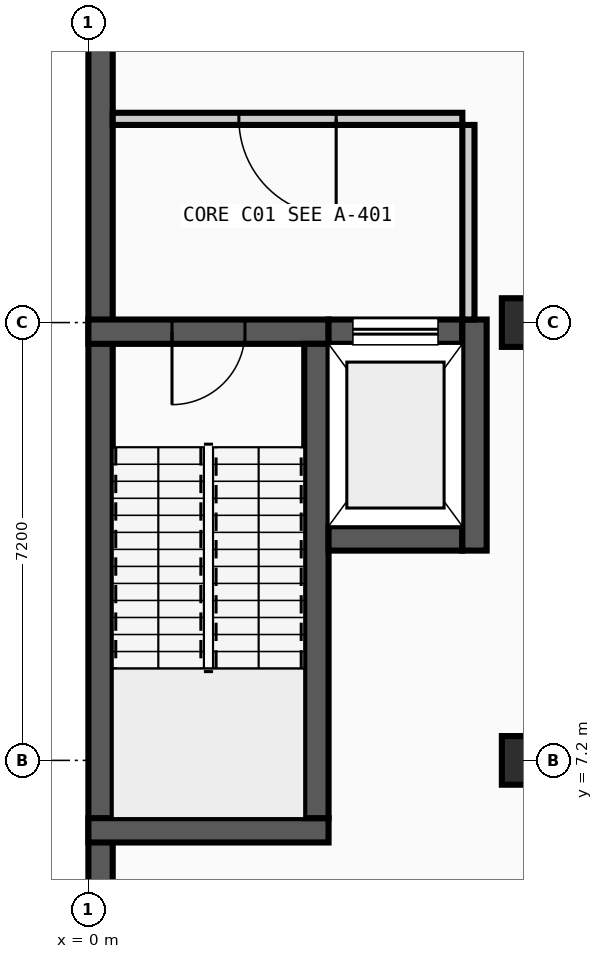
"""IFC4 building model, lengths in metres.
Left out: names, types, materials, properties, quantities, classifications, styles, units other than length and angle.
Written with IfcOpenShell. Run it as: python <this file> out.ifc"""

import sys

from ifc_helpers import new_model, si_unit, direction, frame, frame_2d, origin, origin_2d, place, context, subcontext, project, spatial, rectangle, extrude, element, fill, save


model = new_model("IFC4")
c1 = context("Model", 3, precision=1e-05, world=origin(), true_north=direction((0.0, 1.0)))
c2 = subcontext(c1, "Body", "Model", "MODEL_VIEW")
j1 = project(units=[si_unit("LENGTHUNIT", "METRE"), si_unit("PLANEANGLEUNIT", "RADIAN")], contexts=[c1])
p1 = place(None, origin())
s1 = spatial("IfcSite", under=j1, at=p1, CompositionType="ELEMENT")
p2 = place(p1, origin())
s2 = spatial("IfcBuilding", under=s1, at=p2, CompositionType="ELEMENT")
p3 = place(p2, frame((0.0, 0.0, -4.8)))
s3 = spatial("IfcBuildingStorey", under=s2, at=p3, CompositionType="ELEMENT", Elevation=-4.8)
for number, where, z_axis, x_axis in (
    (1, (7.2, 7.2, 0.0), (0.0, 0.0, 1.0), (1.0, 0.0, 0.0)),
    (2, (7.2, 14.4, 0.0), (0.0, 0.0, 1.0), (1.0, 0.0, 0.0)),
):
    element("IfcColumn", number, at=place(p3, frame(where, z_axis=z_axis, x_axis=x_axis)), inside=s3, PredefinedType="COLUMN", context=c2, shape_type="SweptSolid", body=[
        extrude(rectangle(XDim=0.8, YDim=0.8, at=origin_2d()), origin(), (0.0, 0.0, 1.0), 4.8),
    ])
p4 = place(p3, frame((0.2, 81.6, 0.0), z_axis=(0.0, 0.0, 1.0), x_axis=(0.0, -1.0, 0.0)))
e3 = element("IfcWall", 3, at=p4, inside=s3, PredefinedType="USERDEFINED", context=c2, shape_type="SweptSolid", body=[
    extrude(rectangle(XDim=81.2, YDim=0.4, at=frame_2d((40.6, 0.0))), origin(), (0.0, 0.0, 1.0), 4.545),
])
p5 = place(p3, frame((0.0, 6.05, 0.0), z_axis=(0.0, 0.0, 1.0), x_axis=(1.0, 0.0, 0.0)))
e4 = element("IfcWall", 4, at=p5, inside=s3, PredefinedType="SHEAR", context=c2, shape_type="SweptSolid", body=[
    extrude(rectangle(XDim=3.95, YDim=0.4, at=frame_2d((1.975, 0.0))), origin(), (0.0, 0.0, 1.0), 4.545),
])
p6 = place(p3, frame((0.0, 14.25, 0.0), z_axis=(0.0, 0.0, 1.0), x_axis=(1.0, 0.0, 0.0)))
e5 = element("IfcWall", 5, at=p6, inside=s3, PredefinedType="SHEAR", context=c2, shape_type="SweptSolid", body=[
    extrude(rectangle(XDim=3.95, YDim=0.4, at=frame_2d((1.975, 0.0))), origin(), (0.0, 0.0, 1.0), 4.545),
])
p7 = place(p6, frame((1.375, 0.0, 0.0)))
e6 = element("IfcOpeningElement", 6, at=p7, cuts=e5, PredefinedType="OPENING", context=c2, shape_type="SweptSolid", body=[
    extrude(rectangle(XDim=1.2, YDim=2.15, at=frame_2d((0.6, 1.075))), frame((0.0, 0.21, 0.0), z_axis=(0.0, -1.0, 0.0), x_axis=(1.0, 0.0, 0.0)), (0.0, 0.0, 1.0), 0.42),
])
p8 = place(p3, frame((3.75, 6.25, 0.0), z_axis=(0.0, 0.0, 1.0), x_axis=(0.0, 1.0, 0.0)))
e7 = element("IfcWall", 7, at=p8, inside=s3, PredefinedType="SHEAR", context=c2, shape_type="SweptSolid", body=[
    extrude(rectangle(XDim=7.8, YDim=0.4, at=frame_2d((3.9, 0.0))), origin(), (0.0, 0.0, 1.0), 4.545),
])
p9 = place(p3, frame((3.95, 10.85, 0.0), z_axis=(0.0, 0.0, 1.0), x_axis=(1.0, 0.0, 0.0)))
e8 = element("IfcWall", 8, at=p9, inside=s3, PredefinedType="SHEAR", context=c2, shape_type="SweptSolid", body=[
    extrude(rectangle(XDim=2.2, YDim=0.4, at=frame_2d((1.1, 0.0))), origin(), (0.0, 0.0, 1.0), 4.545),
])
p10 = place(p3, frame((3.95, 14.25, 0.0), z_axis=(0.0, 0.0, 1.0), x_axis=(1.0, 0.0, 0.0)))
e9 = element("IfcWall", 9, at=p10, inside=s3, PredefinedType="SHEAR", context=c2, shape_type="SweptSolid", body=[
    extrude(rectangle(XDim=2.2, YDim=0.4, at=frame_2d((1.1, 0.0))), origin(), (0.0, 0.0, 1.0), 4.545),
])
p11 = place(p10, frame((0.4, 0.0, 0.0)))
e10 = element("IfcOpeningElement", 10, at=p11, cuts=e9, PredefinedType="OPENING", context=c2, shape_type="SweptSolid", body=[
    extrude(rectangle(XDim=1.4, YDim=2.2, at=frame_2d((0.7, 1.1))), frame((0.0, 0.21, 0.0), z_axis=(0.0, -1.0, 0.0), x_axis=(1.0, 0.0, 0.0)), (0.0, 0.0, 1.0), 0.42),
])
p12 = place(p3, frame((6.35, 10.65, 0.0), z_axis=(0.0, 0.0, 1.0), x_axis=(0.0, 1.0, 0.0)))
e11 = element("IfcWall", 11, at=p12, inside=s3, PredefinedType="SHEAR", context=c2, shape_type="SweptSolid", body=[
    extrude(rectangle(XDim=3.8, YDim=0.4, at=frame_2d((1.9, 0.0))), origin(), (0.0, 0.0, 1.0), 4.545),
])
p13 = place(p3, frame((0.4, 17.75, 0.0), z_axis=(0.0, 0.0, 1.0), x_axis=(1.0, 0.0, 0.0)))
e12 = element("IfcWall", 12, at=p13, inside=s3, PredefinedType="PARTITIONING", context=c2, shape_type="SweptSolid", body=[
    extrude(rectangle(XDim=5.75, YDim=0.2, at=frame_2d((2.875, 0.0))), origin(), (0.0, 0.0, 1.0), 4.545),
])
p14 = place(p13, frame((2.075, 0.0, 0.0)))
e13 = element("IfcOpeningElement", 13, at=p14, cuts=e12, PredefinedType="OPENING", context=c2, shape_type="SweptSolid", body=[
    extrude(rectangle(XDim=1.6, YDim=2.2, at=frame_2d((0.8, 1.1))), frame((0.0, 0.11, 0.0), z_axis=(0.0, -1.0, 0.0), x_axis=(1.0, 0.0, 0.0)), (0.0, 0.0, 1.0), 0.22),
])
p15 = place(p3, frame((6.25, 14.45, 0.0), z_axis=(0.0, 0.0, 1.0), x_axis=(0.0, 1.0, 0.0)))
e14 = element("IfcWall", 14, at=p15, inside=s3, PredefinedType="PARTITIONING", context=c2, shape_type="SweptSolid", body=[
    extrude(rectangle(XDim=3.2, YDim=0.2, at=frame_2d((1.6, 0.0))), origin(), (0.0, 0.0, 1.0), 4.545),
])
p16 = place(p7, frame((1.2, 0.0, 0.0), z_axis=(0.0, 0.0, 1.0), x_axis=(-1.0, 0.0, 0.0)))
e15 = element("IfcDoor", 15, at=p16, inside=s3, OperationType="SINGLE_SWING_LEFT", PredefinedType="DOOR", context=c2, shape_type="SweptSolid", body=[
    extrude(rectangle(XDim=1.2, YDim=2.15, at=frame_2d((0.6, 1.075))), frame((0.0, 0.025, 0.0), z_axis=(0.0, -1.0, 0.0), x_axis=(1.0, 0.0, 0.0)), (0.0, 0.0, 1.0), 0.05),
])
fill(e6, e15)
p17 = place(p11, origin())
e16 = element("IfcDoor", 16, at=p17, inside=s3, OperationType="SLIDING_TO_LEFT", PredefinedType="DOOR", context=c2, shape_type="SweptSolid", body=[
    extrude(rectangle(XDim=1.4, YDim=2.2, at=frame_2d((0.7, 1.1))), frame((0.0, 0.025, 0.0), z_axis=(0.0, -1.0, 0.0), x_axis=(1.0, 0.0, 0.0)), (0.0, 0.0, 1.0), 0.05),
])
fill(e10, e16)
p18 = place(p14, origin())
e17 = element("IfcDoor", 17, at=p18, inside=s3, OperationType="DOUBLE_DOOR_SINGLE_SWING", PredefinedType="DOOR", context=c2, shape_type="SweptSolid", body=[
    extrude(rectangle(XDim=1.6, YDim=2.2, at=frame_2d((0.8, 1.1))), frame((0.0, 0.025, 0.0), z_axis=(0.0, -1.0, 0.0), x_axis=(1.0, 0.0, 0.0)), (0.0, 0.0, 1.0), 0.05),
])
fill(e13, e17)
save(model, sys.argv[1])
